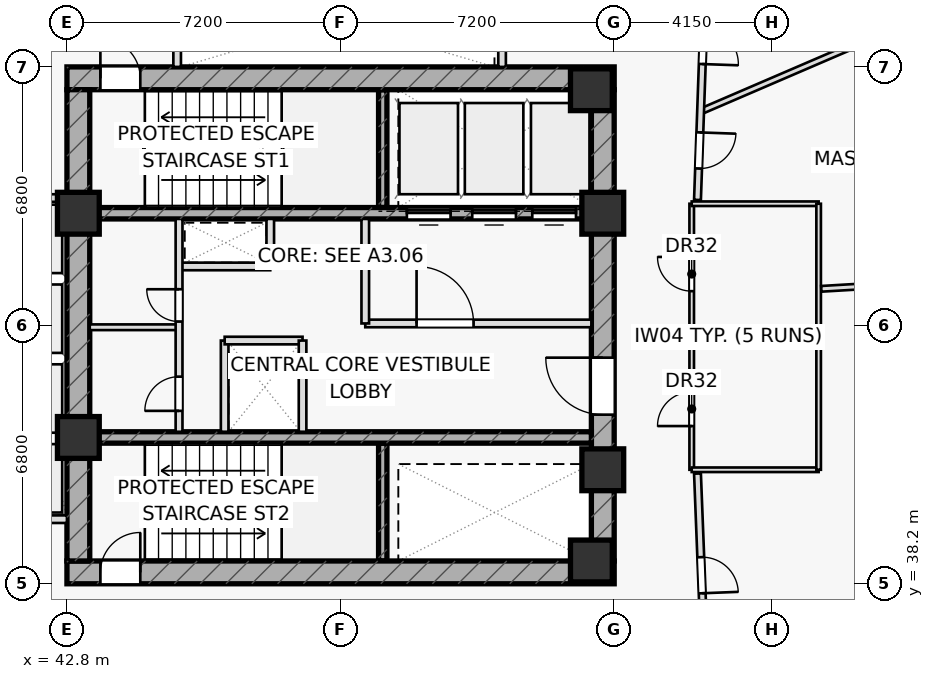
"""IFC4 building model, lengths in metres.
Left out: names, types, materials, properties, quantities, classifications, styles, units other than length and angle.
Written with IfcOpenShell. Run it as: python <this file> out.ifc"""

import sys

from ifc_helpers import new_model, si_unit, direction, frame, frame_2d, origin, origin_2d, place, context, subcontext, project, spatial, rectangle, extrude, element, fill, save


model = new_model("IFC4")
c1 = context("Model", 3, precision=1e-05, world=origin(), true_north=direction((0.0, 1.0)))
c2 = subcontext(c1, "Body", "Model", "MODEL_VIEW")
j1 = project(units=[si_unit("LENGTHUNIT", "METRE"), si_unit("PLANEANGLEUNIT", "RADIAN")], contexts=[c1])
p1 = place(None, origin())
s1 = spatial("IfcSite", under=j1, at=p1, CompositionType="ELEMENT")
p2 = place(p1, origin())
s2 = spatial("IfcBuilding", under=s1, at=p2, CompositionType="ELEMENT")
p3 = place(p2, frame((0.0, 0.0, 51.0)))
s3 = spatial("IfcBuildingStorey", under=s2, at=p3, CompositionType="ELEMENT", Elevation=51.0)
for number, where, z_axis, x_axis in (
    (1, (51.11, 48.1, 0.0), (0.0, 0.0, 1.0), (0.0, 1.0, 0.0)),
    (2, (51.11, 38.8, 0.0), (0.0, 0.0, 1.0), (0.0, 1.0, 0.0)),
):
    element("IfcWall", number, at=place(p3, frame(where, z_axis=z_axis, x_axis=x_axis)), inside=s3, PredefinedType="SHEAR", context=c2, shape_type="SweptSolid", body=[
        extrude(rectangle(XDim=3.1, YDim=0.22, at=frame_2d((1.55, 0.0))), origin(), (0.0, 0.0, 1.0), 3.6),
    ])
p4 = place(p3, frame((42.8, 51.5, 0.0), z_axis=(0.0, 0.0, 1.0), x_axis=(1.0, 0.0, 0.0)))
e3 = element("IfcWall", 3, at=p4, inside=s3, PredefinedType="SHEAR", context=c2, shape_type="SweptSolid", body=[
    extrude(rectangle(XDim=14.4, YDim=0.6, at=frame_2d((7.2, 0.0))), origin(), (0.0, 0.0, 1.0), 3.6),
])
p5 = place(p4, frame((0.88, 0.0, 0.0)))
e4 = element("IfcOpeningElement", 4, at=p5, cuts=e3, PredefinedType="OPENING", context=c2, shape_type="SweptSolid", body=[
    extrude(rectangle(XDim=1.05, YDim=2.2, at=frame_2d((0.525, 1.1))), frame((0.0, 0.31, 0.0), z_axis=(0.0, -1.0, 0.0), x_axis=(1.0, 0.0, 0.0)), (0.0, 0.0, 1.0), 0.62),
])
p6 = place(p3, frame((42.8, 38.5, 0.0), z_axis=(0.0, 0.0, 1.0), x_axis=(1.0, 0.0, 0.0)))
e5 = element("IfcWall", 5, at=p6, inside=s3, PredefinedType="SHEAR", context=c2, shape_type="SweptSolid", body=[
    extrude(rectangle(XDim=14.4, YDim=0.6, at=frame_2d((7.2, 0.0))), origin(), (0.0, 0.0, 1.0), 3.6),
])
p7 = place(p6, frame((0.88, 0.0, 0.0)))
e6 = element("IfcOpeningElement", 6, at=p7, cuts=e5, PredefinedType="OPENING", context=c2, shape_type="SweptSolid", body=[
    extrude(rectangle(XDim=1.05, YDim=2.2, at=frame_2d((0.525, 1.1))), frame((0.0, 0.31, 0.0), z_axis=(0.0, -1.0, 0.0), x_axis=(1.0, 0.0, 0.0)), (0.0, 0.0, 1.0), 0.62),
])
p8 = place(p3, frame((43.1, 38.8, 0.0), z_axis=(0.0, 0.0, 1.0), x_axis=(0.0, 1.0, 0.0)))
e7 = element("IfcWall", 7, at=p8, inside=s3, PredefinedType="SHEAR", context=c2, shape_type="SweptSolid", body=[
    extrude(rectangle(XDim=12.4, YDim=0.6, at=frame_2d((6.2, 0.0))), origin(), (0.0, 0.0, 1.0), 3.6),
])
p9 = place(p3, frame((56.9, 38.8, 0.0), z_axis=(0.0, 0.0, 1.0), x_axis=(0.0, 1.0, 0.0)))
e8 = element("IfcWall", 8, at=p9, inside=s3, PredefinedType="SHEAR", context=c2, shape_type="SweptSolid", body=[
    extrude(rectangle(XDim=12.4, YDim=0.6, at=frame_2d((6.2, 0.0))), origin(), (0.0, 0.0, 1.0), 3.6),
])
p10 = place(p9, frame((3.85, 0.0, 0.0)))
e9 = element("IfcOpeningElement", 9, at=p10, cuts=e8, PredefinedType="OPENING", context=c2, shape_type="SweptSolid", body=[
    extrude(rectangle(XDim=1.5, YDim=2.2, at=frame_2d((0.75, 1.1))), frame((0.0, 0.31, 0.0), z_axis=(0.0, -1.0, 0.0), x_axis=(1.0, 0.0, 0.0)), (0.0, 0.0, 1.0), 0.62),
])
p11 = place(p3, frame((43.4, 47.95, 0.0), z_axis=(0.0, 0.0, 1.0), x_axis=(1.0, 0.0, 0.0)))
e10 = element("IfcWall", 10, at=p11, inside=s3, PredefinedType="SHEAR", context=c2, shape_type="SweptSolid", body=[
    extrude(rectangle(XDim=13.2, YDim=0.3, at=frame_2d((6.6, 0.0))), origin(), (0.0, 0.0, 1.0), 3.6),
])
p12 = place(p11, frame((8.345, 0.0, 0.0)))
e11 = element("IfcOpeningElement", 11, at=p12, cuts=e10, PredefinedType="OPENING", context=c2, shape_type="SweptSolid", body=[
    extrude(rectangle(XDim=1.15, YDim=2.2, at=frame_2d((0.575, 1.1))), frame((0.0, 0.16, 0.0), z_axis=(0.0, -1.0, 0.0), x_axis=(1.0, 0.0, 0.0)), (0.0, 0.0, 1.0), 0.32),
])
p13 = place(p11, frame((10.065, 0.0, 0.0)))
e12 = element("IfcOpeningElement", 12, at=p13, cuts=e10, PredefinedType="OPENING", context=c2, shape_type="SweptSolid", body=[
    extrude(rectangle(XDim=1.15, YDim=2.2, at=frame_2d((0.575, 1.1))), frame((0.0, 0.16, 0.0), z_axis=(0.0, -1.0, 0.0), x_axis=(1.0, 0.0, 0.0)), (0.0, 0.0, 1.0), 0.32),
])
p14 = place(p11, frame((11.645, 0.0, 0.0)))
e13 = element("IfcOpeningElement", 13, at=p14, cuts=e10, PredefinedType="OPENING", context=c2, shape_type="SweptSolid", body=[
    extrude(rectangle(XDim=1.15, YDim=2.2, at=frame_2d((0.575, 1.1))), frame((0.0, 0.16, 0.0), z_axis=(0.0, -1.0, 0.0), x_axis=(1.0, 0.0, 0.0)), (0.0, 0.0, 1.0), 0.32),
])
p15 = place(p3, frame((43.4, 42.05, 0.0), z_axis=(0.0, 0.0, 1.0), x_axis=(1.0, 0.0, 0.0)))
e14 = element("IfcWall", 14, at=p15, inside=s3, PredefinedType="SHEAR", context=c2, shape_type="SweptSolid", body=[
    extrude(rectangle(XDim=13.2, YDim=0.3, at=frame_2d((6.6, 0.0))), origin(), (0.0, 0.0, 1.0), 3.6),
])
for number, where, z_axis, x_axis in (
    (15, (43.1, 47.95, 0.0), (0.0, 0.0, 1.0), (1.0, 0.0, 0.0)),
    (16, (56.9, 47.95, 0.0), (0.0, 0.0, 1.0), (1.0, 0.0, 0.0)),
    (17, (56.6, 51.2, 0.0), (0.0, 0.0, 1.0), (1.0, 0.0, 0.0)),
    (18, (43.1, 42.05, 0.0), (0.0, 0.0, 1.0), (1.0, 0.0, 0.0)),
    (19, (56.9, 41.2, 0.0), (0.0, 0.0, 1.0), (1.0, 0.0, 0.0)),
    (20, (56.6, 38.8, 0.0), (0.0, 0.0, 1.0), (1.0, 0.0, 0.0)),
):
    element("IfcColumn", number, at=place(p3, frame(where, z_axis=z_axis, x_axis=x_axis)), inside=s3, PredefinedType="COLUMN", context=c2, shape_type="SweptSolid", body=[
        extrude(rectangle(XDim=1.1, YDim=1.1, at=origin_2d()), origin(), (0.0, 0.0, 1.0), 3.6),
    ])
for number, where, z_axis, x_axis in (
    (21, (40.3, 39.9, 0.0), (0.0, 0.0, 1.0), (1.0, 0.0, 0.0)),
    (22, (40.3, 48.35, 0.0), (0.0, 0.0, 1.0), (1.0, 0.0, 0.0)),
    (23, (45.7, 51.8, 0.0), (0.0, 0.0, 1.0), (0.0, 1.0, 0.0)),
    (24, (54.25, 51.8, 0.0), (0.0, 0.0, 1.0), (0.0, 1.0, 0.0)),
):
    element("IfcWall", number, at=place(p3, frame(where, z_axis=z_axis, x_axis=x_axis)), inside=s3, PredefinedType="PARTITIONING", context=c2, shape_type="SweptSolid", body=[
        extrude(rectangle(XDim=2.5, YDim=0.2, at=frame_2d((1.25, 0.0))), origin(), (0.0, 0.0, 1.0), 3.6),
    ])
p16 = place(p3, frame((45.75, 46.55, 0.0), z_axis=(0.0, 0.0, 1.0), x_axis=(1.0, 0.0, 0.0)))
e25 = element("IfcWall", 25, at=p16, inside=s3, PredefinedType="PARTITIONING", context=c2, shape_type="SweptSolid", body=[
    extrude(rectangle(XDim=2.4, YDim=0.2, at=frame_2d((1.2, 0.0))), origin(), (0.0, 0.0, 1.0), 3.6),
])
p17 = place(p3, frame((48.15, 46.55, 0.0), z_axis=(0.0, 0.0, 1.0), x_axis=(0.0, 1.0, 0.0)))
e26 = element("IfcWall", 26, at=p17, inside=s3, PredefinedType="PARTITIONING", context=c2, shape_type="SweptSolid", body=[
    extrude(rectangle(XDim=1.25, YDim=0.2, at=frame_2d((0.625, 0.0))), origin(), (0.0, 0.0, 1.0), 3.6),
])
p18 = place(p3, frame((46.95, 42.2, 0.0), z_axis=(0.0, 0.0, 1.0), x_axis=(0.0, 1.0, 0.0)))
e27 = element("IfcWall", 27, at=p18, inside=s3, PredefinedType="PARTITIONING", context=c2, shape_type="SweptSolid", body=[
    extrude(rectangle(XDim=2.4, YDim=0.2, at=frame_2d((1.2, 0.0))), origin(), (0.0, 0.0, 1.0), 3.6),
])
p19 = place(p3, frame((46.95, 44.6, 0.0), z_axis=(0.0, 0.0, 1.0), x_axis=(1.0, 0.0, 0.0)))
e28 = element("IfcWall", 28, at=p19, inside=s3, PredefinedType="PARTITIONING", context=c2, shape_type="SweptSolid", body=[
    extrude(rectangle(XDim=2.05, YDim=0.2, at=frame_2d((1.025, 0.0))), origin(), (0.0, 0.0, 1.0), 3.6),
])
p20 = place(p3, frame((50.65, 45.05, 0.0), z_axis=(0.0, 0.0, 1.0), x_axis=(1.0, 0.0, 0.0)))
e29 = element("IfcWall", 29, at=p20, inside=s3, PredefinedType="PARTITIONING", context=c2, shape_type="SweptSolid", body=[
    extrude(rectangle(XDim=5.95, YDim=0.2, at=frame_2d((2.975, 0.0))), origin(), (0.0, 0.0, 1.0), 3.6),
])
p21 = place(p20, frame((1.35, 0.0, 0.0)))
e30 = element("IfcOpeningElement", 30, at=p21, cuts=e29, PredefinedType="OPENING", context=c2, shape_type="SweptSolid", body=[
    extrude(rectangle(XDim=1.5, YDim=2.2, at=frame_2d((0.75, 1.1))), frame((0.0, 0.11, 0.0), z_axis=(0.0, -1.0, 0.0), x_axis=(1.0, 0.0, 0.0)), (0.0, 0.0, 1.0), 0.22),
])
p22 = place(p3, frame((50.65, 45.05, 0.0), z_axis=(0.0, 0.0, 1.0), x_axis=(0.0, 1.0, 0.0)))
e31 = element("IfcWall", 31, at=p22, inside=s3, PredefinedType="PARTITIONING", context=c2, shape_type="SweptSolid", body=[
    extrude(rectangle(XDim=2.75, YDim=0.2, at=frame_2d((1.375, 0.0))), origin(), (0.0, 0.0, 1.0), 3.6),
])
p23 = place(p3, frame((43.4, 44.95, 0.0), z_axis=(0.0, 0.0, 1.0), x_axis=(1.0, 0.0, 0.0)))
e32 = element("IfcWall", 32, at=p23, inside=s3, PredefinedType="PARTITIONING", context=c2, shape_type="SweptSolid", body=[
    extrude(rectangle(XDim=2.35, YDim=0.15, at=frame_2d((1.175, 0.0))), origin(), (0.0, 0.0, 1.0), 3.6),
])
p24 = place(p3, frame((45.75, 42.2, 0.0), z_axis=(0.0, 0.0, 1.0), x_axis=(0.0, 1.0, 0.0)))
e33 = element("IfcWall", 33, at=p24, inside=s3, PredefinedType="PARTITIONING", context=c2, shape_type="SweptSolid", body=[
    extrude(rectangle(XDim=5.6, YDim=0.18, at=frame_2d((2.8, 0.0))), origin(), (0.0, 0.0, 1.0), 3.6),
])
p25 = place(p24, frame((0.55, 0.0, 0.0)))
e34 = element("IfcOpeningElement", 34, at=p25, cuts=e33, PredefinedType="OPENING", context=c2, shape_type="SweptSolid", body=[
    extrude(rectangle(XDim=0.9, YDim=2.05, at=frame_2d((0.45, 1.025))), frame((0.0, 0.1, 0.0), z_axis=(0.0, -1.0, 0.0), x_axis=(1.0, 0.0, 0.0)), (0.0, 0.0, 1.0), 0.2),
])
p26 = place(p24, frame((2.9, 0.0, 0.0)))
e35 = element("IfcOpeningElement", 35, at=p26, cuts=e33, PredefinedType="OPENING", context=c2, shape_type="SweptSolid", body=[
    extrude(rectangle(XDim=0.85, YDim=2.05, at=frame_2d((0.425, 1.025))), frame((0.0, 0.1, 0.0), z_axis=(0.0, -1.0, 0.0), x_axis=(1.0, 0.0, 0.0)), (0.0, 0.0, 1.0), 0.2),
])
p27 = place(p3, frame((59.24, 41.2, 0.0), z_axis=(0.0, 0.0, 1.0), x_axis=(0.0, 1.0, 0.0)))
e36 = element("IfcWall", 36, at=p27, inside=s3, PredefinedType="PARTITIONING", context=c2, shape_type="SweptSolid", body=[
    extrude(rectangle(XDim=7.0, YDim=0.12, at=frame_2d((3.5, 0.0))), origin(), (0.0, 0.0, 1.0), 3.6),
])
p28 = place(p27, frame((1.15, 0.0, 0.0)))
e37 = element("IfcOpeningElement", 37, at=p28, cuts=e36, PredefinedType="OPENING", context=c2, shape_type="SweptSolid", body=[
    extrude(rectangle(XDim=0.9, YDim=2.05, at=frame_2d((0.45, 1.025))), frame((0.0, 0.07, 0.0), z_axis=(0.0, -1.0, 0.0), x_axis=(1.0, 0.0, 0.0)), (0.0, 0.0, 1.0), 0.14),
])
p29 = place(p27, frame((4.7, 0.0, 0.0)))
e38 = element("IfcOpeningElement", 38, at=p29, cuts=e36, PredefinedType="OPENING", context=c2, shape_type="SweptSolid", body=[
    extrude(rectangle(XDim=0.9, YDim=2.05, at=frame_2d((0.45, 1.025))), frame((0.0, 0.07, 0.0), z_axis=(0.0, -1.0, 0.0), x_axis=(1.0, 0.0, 0.0)), (0.0, 0.0, 1.0), 0.14),
])
p30 = place(p3, frame((59.24, 41.2, 0.0), z_axis=(0.0, 0.0, 1.0), x_axis=(1.0, 0.0, 0.0)))
e39 = element("IfcWall", 39, at=p30, inside=s3, PredefinedType="PARTITIONING", context=c2, shape_type="SweptSolid", body=[
    extrude(rectangle(XDim=3.34, YDim=0.12, at=frame_2d((1.67, 0.0))), origin(), (0.0, 0.0, 1.0), 2.925),
])
for number, where, z_axis, x_axis in (
    (40, (59.24, 44.65, 0.0), (0.0, 0.0, 1.0), (1.0, 0.0, 0.0)),
    (41, (59.24, 48.2, 0.0), (0.0, 0.0, 1.0), (1.0, 0.0, 0.0)),
):
    element("IfcWall", number, at=place(p3, frame(where, z_axis=z_axis, x_axis=x_axis)), inside=s3, PredefinedType="PARTITIONING", context=c2, shape_type="SweptSolid", body=[
        extrude(rectangle(XDim=3.34, YDim=0.12, at=frame_2d((1.67, 0.0))), origin(), (0.0, 0.0, 1.0), 3.6),
    ])
p31 = place(p3, frame((62.58, 41.2, 0.0), z_axis=(0.0, 0.0, 1.0), x_axis=(0.0, 1.0, 0.0)))
e42 = element("IfcWall", 42, at=p31, inside=s3, PredefinedType="PARTITIONING", context=c2, shape_type="SweptSolid", body=[
    extrude(rectangle(XDim=7.0, YDim=0.12, at=frame_2d((3.5, 0.0))), origin(), (0.0, 0.0, 1.0), 3.6),
])
p32 = place(p3, frame((62.65, 45.961, 0.0), z_axis=(0.0, 0.0, 1.0), x_axis=(0.99825565381, 0.059039390554, 0.0)))
e43 = element("IfcWall", 43, at=p32, inside=s3, PredefinedType="PARTITIONING", context=c2, shape_type="SweptSolid", body=[
    extrude(rectangle(XDim=9.966, YDim=0.15, at=frame_2d((4.983, 0.0))), origin(), (0.0, 0.0, 1.0), 2.975),
])
p33 = place(p3, frame((59.474, 50.627, 0.0), z_axis=(0.0, 0.0, 1.0), x_axis=(0.918538605695, 0.395331291259, 0.0)))
e44 = element("IfcWall", 44, at=p33, inside=s3, PredefinedType="PARTITIONING", context=c2, shape_type="SweptSolid", body=[
    extrude(rectangle(XDim=9.659, YDim=0.15, at=frame_2d((4.829, 0.0))), origin(), (0.0, 0.0, 1.0), 2.925),
])
p34 = place(p3, frame((59.602, 54.25, 0.0), z_axis=(0.0, 0.0, 1.0), x_axis=(-0.035265891834, -0.999377964973, 0.0)))
e45 = element("IfcWall", 45, at=p34, inside=s3, PredefinedType="PARTITIONING", context=c2, shape_type="SweptSolid", body=[
    extrude(rectangle(XDim=5.954, YDim=0.18, at=frame_2d((2.977, 0.0))), origin(), (0.0, 0.0, 1.0), 2.925),
])
p35 = place(p34, frame((1.426, 0.0, 0.0)))
e46 = element("IfcOpeningElement", 46, at=p35, cuts=e45, PredefinedType="OPENING", context=c2, shape_type="SweptSolid", body=[
    extrude(rectangle(XDim=0.95, YDim=2.05, at=frame_2d((0.475, 1.025))), frame((0.0, 0.1, 0.0), z_axis=(0.0, -1.0, 0.0), x_axis=(1.0, 0.0, 0.0)), (0.0, 0.0, 1.0), 0.2),
])
p36 = place(p34, frame((4.176, 0.0, 0.0)))
e47 = element("IfcOpeningElement", 47, at=p36, cuts=e45, PredefinedType="OPENING", context=c2, shape_type="SweptSolid", body=[
    extrude(rectangle(XDim=0.95, YDim=2.05, at=frame_2d((0.475, 1.025))), frame((0.0, 0.1, 0.0), z_axis=(0.0, -1.0, 0.0), x_axis=(1.0, 0.0, 0.0)), (0.0, 0.0, 1.0), 0.2),
])
p37 = place(p3, frame((59.392, 41.1, 0.0), z_axis=(0.0, 0.0, 1.0), x_axis=(0.03921413315, -0.999230830069, 0.0)))
e48 = element("IfcWall", 48, at=p37, inside=s3, PredefinedType="PARTITIONING", context=c2, shape_type="SweptSolid", body=[
    extrude(rectangle(XDim=5.354, YDim=0.18, at=frame_2d((2.677, 0.0))), origin(), (0.0, 0.0, 1.0), 2.925),
])
p38 = place(p37, frame((2.202, 0.0, 0.0)))
e49 = element("IfcOpeningElement", 49, at=p38, cuts=e48, PredefinedType="OPENING", context=c2, shape_type="SweptSolid", body=[
    extrude(rectangle(XDim=0.95, YDim=2.05, at=frame_2d((0.475, 1.025))), frame((0.0, 0.1, 0.0), z_axis=(0.0, -1.0, 0.0), x_axis=(1.0, 0.0, 0.0)), (0.0, 0.0, 1.0), 0.2),
])
p39 = place(p3, frame((49.0, 42.2, 0.0), z_axis=(0.0, 0.0, 1.0), x_axis=(0.0, 1.0, 0.0)))
e50 = element("IfcWall", 50, at=p39, inside=s3, PredefinedType="PARTITIONING", context=c2, shape_type="SweptSolid", body=[
    extrude(rectangle(XDim=2.4, YDim=0.2, at=frame_2d((1.2, 0.0))), origin(), (0.0, 0.0, 1.0), 3.6),
])
p40 = place(p5, origin())
e51 = element("IfcDoor", 51, at=p40, inside=s3, OperationType="SINGLE_SWING_LEFT", PredefinedType="DOOR", context=c2, shape_type="SweptSolid", body=[
    extrude(rectangle(XDim=1.05, YDim=2.2, at=frame_2d((0.525, 1.1))), frame((0.0, 0.025, 0.0), z_axis=(0.0, -1.0, 0.0), x_axis=(1.0, 0.0, 0.0)), (0.0, 0.0, 1.0), 0.05),
])
fill(e4, e51)
p41 = place(p7, origin())
e52 = element("IfcDoor", 52, at=p41, inside=s3, OperationType="SINGLE_SWING_RIGHT", PredefinedType="DOOR", context=c2, shape_type="SweptSolid", body=[
    extrude(rectangle(XDim=1.05, YDim=2.2, at=frame_2d((0.525, 1.1))), frame((0.0, 0.025, 0.0), z_axis=(0.0, -1.0, 0.0), x_axis=(1.0, 0.0, 0.0)), (0.0, 0.0, 1.0), 0.05),
])
fill(e6, e52)
p42 = place(p10, origin())
e53 = element("IfcDoor", 53, at=p42, inside=s3, OperationType="SINGLE_SWING_RIGHT", PredefinedType="DOOR", context=c2, shape_type="SweptSolid", body=[
    extrude(rectangle(XDim=1.5, YDim=2.2, at=frame_2d((0.75, 1.1))), frame((0.0, 0.025, 0.0), z_axis=(0.0, -1.0, 0.0), x_axis=(1.0, 0.0, 0.0)), (0.0, 0.0, 1.0), 0.05),
])
fill(e9, e53)
p43 = place(p21, origin())
e54 = element("IfcDoor", 54, at=p43, inside=s3, OperationType="SINGLE_SWING_LEFT", PredefinedType="DOOR", context=c2, shape_type="SweptSolid", body=[
    extrude(rectangle(XDim=1.5, YDim=2.2, at=frame_2d((0.75, 1.1))), frame((0.0, 0.025, 0.0), z_axis=(0.0, -1.0, 0.0), x_axis=(1.0, 0.0, 0.0)), (0.0, 0.0, 1.0), 0.05),
])
fill(e30, e54)
p44 = place(p25, origin())
e55 = element("IfcDoor", 55, at=p44, inside=s3, OperationType="SINGLE_SWING_LEFT", PredefinedType="DOOR", context=c2, shape_type="SweptSolid", body=[
    extrude(rectangle(XDim=0.9, YDim=2.05, at=frame_2d((0.45, 1.025))), frame((0.0, 0.025, 0.0), z_axis=(0.0, -1.0, 0.0), x_axis=(1.0, 0.0, 0.0)), (0.0, 0.0, 1.0), 0.05),
])
fill(e34, e55)
p45 = place(p26, origin())
e56 = element("IfcDoor", 56, at=p45, inside=s3, OperationType="SINGLE_SWING_RIGHT", PredefinedType="DOOR", context=c2, shape_type="SweptSolid", body=[
    extrude(rectangle(XDim=0.85, YDim=2.05, at=frame_2d((0.425, 1.025))), frame((0.0, 0.025, 0.0), z_axis=(0.0, -1.0, 0.0), x_axis=(1.0, 0.0, 0.0)), (0.0, 0.0, 1.0), 0.05),
])
fill(e35, e56)
p46 = place(p28, origin())
e57 = element("IfcDoor", 57, at=p46, inside=s3, OperationType="SINGLE_SWING_LEFT", PredefinedType="DOOR", context=c2, shape_type="SweptSolid", body=[
    extrude(rectangle(XDim=0.9, YDim=2.05, at=frame_2d((0.45, 1.025))), frame((0.0, 0.025, 0.0), z_axis=(0.0, -1.0, 0.0), x_axis=(1.0, 0.0, 0.0)), (0.0, 0.0, 1.0), 0.05),
])
fill(e37, e57)
p47 = place(p29, origin())
e58 = element("IfcDoor", 58, at=p47, inside=s3, OperationType="SINGLE_SWING_RIGHT", PredefinedType="DOOR", context=c2, shape_type="SweptSolid", body=[
    extrude(rectangle(XDim=0.9, YDim=2.05, at=frame_2d((0.45, 1.025))), frame((0.0, 0.025, 0.0), z_axis=(0.0, -1.0, 0.0), x_axis=(1.0, 0.0, 0.0)), (0.0, 0.0, 1.0), 0.05),
])
fill(e38, e58)
p48 = place(p35, origin())
e59 = element("IfcDoor", 59, at=p48, inside=s3, OperationType="SINGLE_SWING_RIGHT", PredefinedType="DOOR", context=c2, shape_type="SweptSolid", body=[
    extrude(rectangle(XDim=0.95, YDim=2.05, at=frame_2d((0.475, 1.025))), frame((0.0, 0.025, 0.0), z_axis=(0.0, -1.0, 0.0), x_axis=(1.0, 0.0, 0.0)), (0.0, 0.0, 1.0), 0.05),
])
fill(e46, e59)
p49 = place(p36, origin())
e60 = element("IfcDoor", 60, at=p49, inside=s3, OperationType="SINGLE_SWING_LEFT", PredefinedType="DOOR", context=c2, shape_type="SweptSolid", body=[
    extrude(rectangle(XDim=0.95, YDim=2.05, at=frame_2d((0.475, 1.025))), frame((0.0, 0.025, 0.0), z_axis=(0.0, -1.0, 0.0), x_axis=(1.0, 0.0, 0.0)), (0.0, 0.0, 1.0), 0.05),
])
fill(e47, e60)
p50 = place(p38, origin())
e61 = element("IfcDoor", 61, at=p50, inside=s3, OperationType="SINGLE_SWING_RIGHT", PredefinedType="DOOR", context=c2, shape_type="SweptSolid", body=[
    extrude(rectangle(XDim=0.95, YDim=2.05, at=frame_2d((0.475, 1.025))), frame((0.0, 0.025, 0.0), z_axis=(0.0, -1.0, 0.0), x_axis=(1.0, 0.0, 0.0)), (0.0, 0.0, 1.0), 0.05),
])
fill(e49, e61)
p51 = place(p12, origin())
e62 = element("IfcDoor", 62, at=p51, inside=s3, OperationType="SLIDING_TO_LEFT", PredefinedType="DOOR", context=c2, shape_type="SweptSolid", body=[
    extrude(rectangle(XDim=1.15, YDim=2.2, at=frame_2d((0.575, 1.1))), frame((0.0, 0.025, 0.0), z_axis=(0.0, -1.0, 0.0), x_axis=(1.0, 0.0, 0.0)), (0.0, 0.0, 1.0), 0.05),
])
fill(e11, e62)
p52 = place(p13, origin())
e63 = element("IfcDoor", 63, at=p52, inside=s3, OperationType="SLIDING_TO_LEFT", PredefinedType="DOOR", context=c2, shape_type="SweptSolid", body=[
    extrude(rectangle(XDim=1.15, YDim=2.2, at=frame_2d((0.575, 1.1))), frame((0.0, 0.025, 0.0), z_axis=(0.0, -1.0, 0.0), x_axis=(1.0, 0.0, 0.0)), (0.0, 0.0, 1.0), 0.05),
])
fill(e12, e63)
p53 = place(p14, origin())
e64 = element("IfcDoor", 64, at=p53, inside=s3, OperationType="SLIDING_TO_LEFT", PredefinedType="DOOR", context=c2, shape_type="SweptSolid", body=[
    extrude(rectangle(XDim=1.15, YDim=2.2, at=frame_2d((0.575, 1.1))), frame((0.0, 0.025, 0.0), z_axis=(0.0, -1.0, 0.0), x_axis=(1.0, 0.0, 0.0)), (0.0, 0.0, 1.0), 0.05),
])
fill(e13, e64)
save(model, sys.argv[1])
